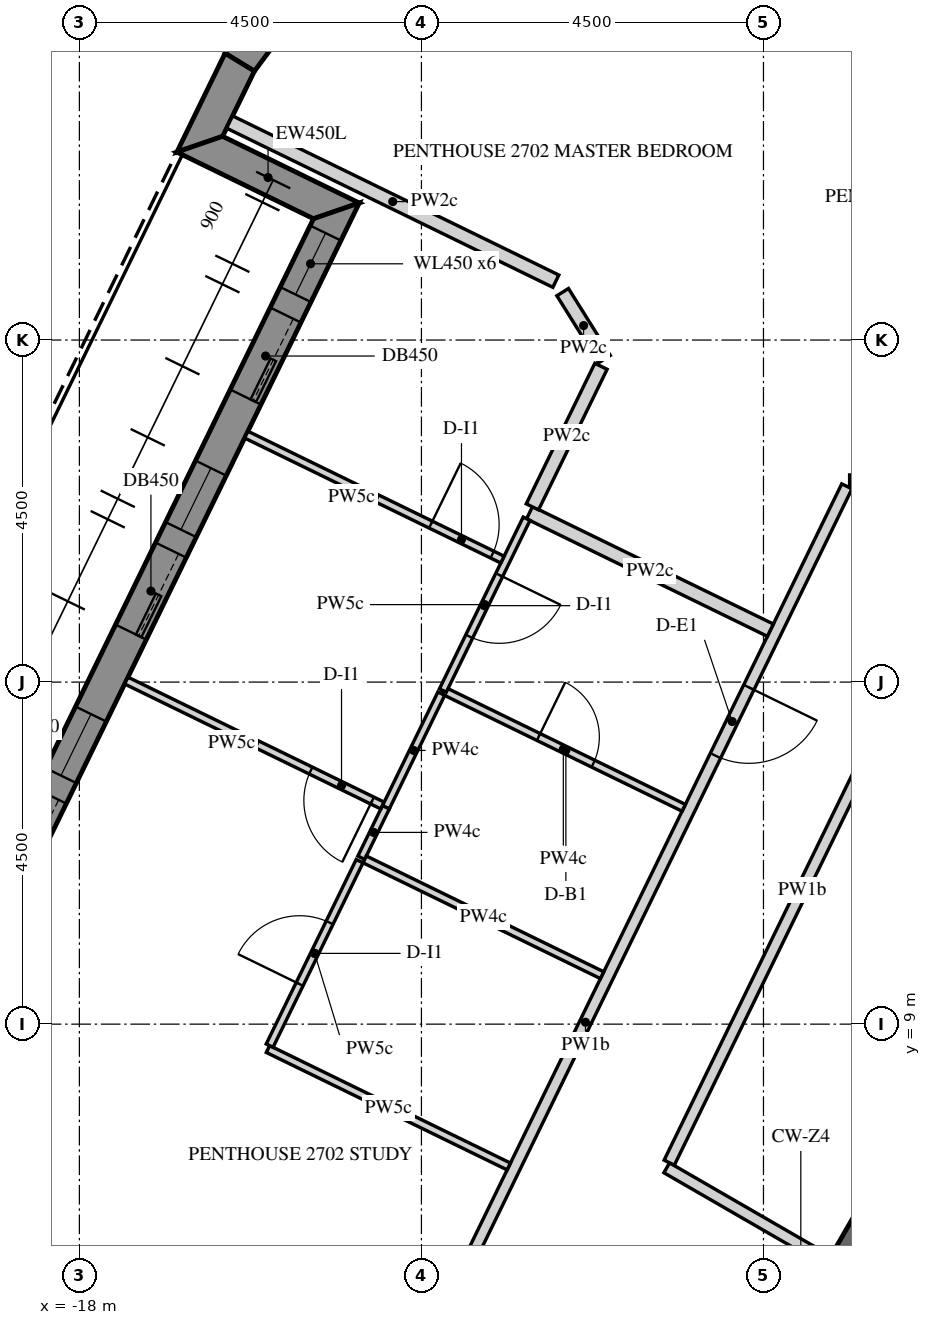
"""IFC4 building model, lengths in metres.
Left out: names, types, materials, properties, quantities, classifications, styles, units other than length and angle.
Written with IfcOpenShell. Run it as: python <this file> out.ifc"""

import sys

from ifc_helpers import new_model, si_unit, direction, frame, frame_2d, origin, place, context, subcontext, project, spatial, polyline, rectangle, outline, extrude, element, fill, save


model = new_model("IFC4")
c1 = context("Model", 3, precision=1e-05, world=origin(), true_north=direction((0.0, 1.0)))
c2 = subcontext(c1, "Body", "Model", "MODEL_VIEW")
j1 = project(units=[si_unit("LENGTHUNIT", "METRE"), si_unit("PLANEANGLEUNIT", "RADIAN")], contexts=[c1])
p1 = place(None, origin())
s1 = spatial("IfcSite", under=j1, at=p1, CompositionType="ELEMENT")
p2 = place(p1, origin())
s2 = spatial("IfcBuilding", under=s1, at=p2, CompositionType="ELEMENT")
p3 = place(p2, frame((0.0, 0.0, 353.4)))
s3 = spatial("IfcBuildingStorey", under=s2, at=p3, CompositionType="ELEMENT", Elevation=353.4)
p4 = place(p3, frame((-15.056, 22.776, -0.15), z_axis=(0.0, 0.0, 1.0), x_axis=(-0.597089203515, -0.802174845682, 0.0)))
e1 = element("IfcWall", 1, at=p4, inside=s3, PredefinedType="SOLIDWALL", context=c2, shape_type="SweptSolid", body=[
    extrude(outline(polyline([(-0.042, -0.225), (1.418, -0.225), (1.376, 0.225), (0.042, 0.225), (-0.042, -0.225)])), origin(), (0.0, 0.0, 1.0), 3.9),
])
p5 = place(p3, frame((-15.89, 21.655, -0.15), z_axis=(0.0, 0.0, 1.0), x_axis=(-0.438319390103, -0.898819287877, 0.0)))
e2 = element("IfcWall", 2, at=p5, inside=s3, PredefinedType="SOLIDWALL", context=c2, shape_type="SweptSolid", body=[
    extrude(outline(polyline([(-0.021, -0.225), (1.425, -0.225), (0.975, 0.225), (0.021, 0.225), (-0.021, -0.225)])), origin(), (0.0, 0.0, 1.0), 3.9),
])
p6 = place(p3, frame((-16.416, 20.576, -0.15), z_axis=(0.0, 0.0, 1.0), x_axis=(0.898730898244, -0.438500595829, 0.0)))
e3 = element("IfcWall", 3, at=p6, inside=s3, PredefinedType="SOLIDWALL", context=c2, shape_type="SweptSolid", body=[
    extrude(outline(polyline([(-0.225, -0.225), (1.775, -0.225), (2.225, 0.225), (0.225, 0.225), (-0.225, -0.225)])), origin(), (0.0, 0.0, 1.0), 3.9),
])
p7 = place(p3, frame((-14.619, 19.699, -0.15), z_axis=(0.0, 0.0, 1.0), x_axis=(-0.438373747484, -0.898792777851, 0.0)))
e4 = element("IfcWall", 4, at=p7, inside=s3, PredefinedType="SOLIDWALL", context=c2, shape_type="SweptSolid", body=[
    extrude(outline(polyline([(0.225, -0.225), (20.506, -0.225), (20.957, 0.225), (-0.225, 0.225), (0.225, -0.225)])), origin(), (0.0, 0.0, 1.0), 3.9),
])
p8 = place(p7, frame((0.325, 0.0, 1.05)))
e5 = element("IfcOpeningElement", 5, at=p8, cuts=e4, PredefinedType="OPENING", context=c2, shape_type="SweptSolid", body=[
    extrude(rectangle(XDim=0.9, YDim=1.5, at=frame_2d((0.45, 0.75))), frame((0.0, 0.235, 0.0), z_axis=(0.0, -1.0, 0.0), x_axis=(1.0, 0.0, 0.0)), (0.0, 0.0, 1.0), 0.47),
])
p9 = place(p7, frame((1.525, 0.0, 0.15)))
e6 = element("IfcOpeningElement", 6, at=p9, cuts=e4, PredefinedType="OPENING", context=c2, shape_type="SweptSolid", body=[
    extrude(rectangle(XDim=1.2, YDim=2.4, at=frame_2d((0.6, 1.2))), frame((0.0, 0.235, 0.0), z_axis=(0.0, -1.0, 0.0), x_axis=(1.0, 0.0, 0.0)), (0.0, 0.0, 1.0), 0.47),
])
p10 = place(p7, frame((3.766, 0.0, 1.05)))
e7 = element("IfcOpeningElement", 7, at=p10, cuts=e4, PredefinedType="OPENING", context=c2, shape_type="SweptSolid", body=[
    extrude(rectangle(XDim=0.9, YDim=1.5, at=frame_2d((0.45, 0.75))), frame((0.0, 0.235, 0.0), z_axis=(0.0, -1.0, 0.0), x_axis=(1.0, 0.0, 0.0)), (0.0, 0.0, 1.0), 0.47),
])
p11 = place(p7, frame((4.966, 0.0, 0.15)))
e8 = element("IfcOpeningElement", 8, at=p11, cuts=e4, PredefinedType="OPENING", context=c2, shape_type="SweptSolid", body=[
    extrude(rectangle(XDim=1.2, YDim=2.4, at=frame_2d((0.6, 1.2))), frame((0.0, 0.235, 0.0), z_axis=(0.0, -1.0, 0.0), x_axis=(1.0, 0.0, 0.0)), (0.0, 0.0, 1.0), 0.47),
])
p12 = place(p7, frame((7.366, 0.0, 1.05)))
e9 = element("IfcOpeningElement", 9, at=p12, cuts=e4, PredefinedType="OPENING", context=c2, shape_type="SweptSolid", body=[
    extrude(rectangle(XDim=0.9, YDim=1.5, at=frame_2d((0.45, 0.75))), frame((0.0, 0.235, 0.0), z_axis=(0.0, -1.0, 0.0), x_axis=(1.0, 0.0, 0.0)), (0.0, 0.0, 1.0), 0.47),
])
p13 = place(p7, frame((8.566, 0.0, 0.15)))
e10 = element("IfcOpeningElement", 10, at=p13, cuts=e4, PredefinedType="OPENING", context=c2, shape_type="SweptSolid", body=[
    extrude(rectangle(XDim=1.2, YDim=2.4, at=frame_2d((0.6, 1.2))), frame((0.0, 0.235, 0.0), z_axis=(0.0, -1.0, 0.0), x_axis=(1.0, 0.0, 0.0)), (0.0, 0.0, 1.0), 0.47),
])
p14 = place(p7, frame((10.966, 0.0, 1.05)))
e11 = element("IfcOpeningElement", 11, at=p14, cuts=e4, PredefinedType="OPENING", context=c2, shape_type="SweptSolid", body=[
    extrude(rectangle(XDim=0.9, YDim=1.5, at=frame_2d((0.45, 0.75))), frame((0.0, 0.235, 0.0), z_axis=(0.0, -1.0, 0.0), x_axis=(1.0, 0.0, 0.0)), (0.0, 0.0, 1.0), 0.47),
])
p15 = place(p7, frame((12.166, 0.0, 0.15)))
e12 = element("IfcOpeningElement", 12, at=p15, cuts=e4, PredefinedType="OPENING", context=c2, shape_type="SweptSolid", body=[
    extrude(rectangle(XDim=1.2, YDim=2.4, at=frame_2d((0.6, 1.2))), frame((0.0, 0.235, 0.0), z_axis=(0.0, -1.0, 0.0), x_axis=(1.0, 0.0, 0.0)), (0.0, 0.0, 1.0), 0.47),
])
p16 = place(p7, frame((14.566, 0.0, 1.05)))
e13 = element("IfcOpeningElement", 13, at=p16, cuts=e4, PredefinedType="OPENING", context=c2, shape_type="SweptSolid", body=[
    extrude(rectangle(XDim=0.9, YDim=1.5, at=frame_2d((0.45, 0.75))), frame((0.0, 0.235, 0.0), z_axis=(0.0, -1.0, 0.0), x_axis=(1.0, 0.0, 0.0)), (0.0, 0.0, 1.0), 0.47),
])
p17 = place(p7, frame((15.766, 0.0, 0.15)))
e14 = element("IfcOpeningElement", 14, at=p17, cuts=e4, PredefinedType="OPENING", context=c2, shape_type="SweptSolid", body=[
    extrude(rectangle(XDim=1.2, YDim=2.4, at=frame_2d((0.6, 1.2))), frame((0.0, 0.235, 0.0), z_axis=(0.0, -1.0, 0.0), x_axis=(1.0, 0.0, 0.0)), (0.0, 0.0, 1.0), 0.47),
])
p18 = place(p7, frame((18.007, 0.0, 1.05)))
e15 = element("IfcOpeningElement", 15, at=p18, cuts=e4, PredefinedType="OPENING", context=c2, shape_type="SweptSolid", body=[
    extrude(rectangle(XDim=0.9, YDim=1.5, at=frame_2d((0.45, 0.75))), frame((0.0, 0.235, 0.0), z_axis=(0.0, -1.0, 0.0), x_axis=(1.0, 0.0, 0.0)), (0.0, 0.0, 1.0), 0.47),
])
p19 = place(p7, frame((19.207, 0.0, 0.15)))
e16 = element("IfcOpeningElement", 16, at=p19, cuts=e4, PredefinedType="OPENING", context=c2, shape_type="SweptSolid", body=[
    extrude(rectangle(XDim=1.2, YDim=2.4, at=frame_2d((0.6, 1.2))), frame((0.0, 0.235, 0.0), z_axis=(0.0, -1.0, 0.0), x_axis=(1.0, 0.0, 0.0)), (0.0, 0.0, 1.0), 0.47),
])
p20 = place(p3, frame((-5.673, 9.825, -0.15), z_axis=(0.0, 0.0, 1.0), x_axis=(-0.499995046907, -0.866028263435, 0.0)))
e17 = element("IfcWall", 17, at=p20, inside=s3, PredefinedType="SHEAR", context=c2, shape_type="SweptSolid", body=[
    extrude(outline(polyline([(-0.101, -0.175), (11.446, -0.175), (11.244, 0.175), (0.101, 0.175), (-0.101, -0.175)])), origin(), (0.0, 0.0, 1.0), 3.9),
])
p21 = place(p20, frame((4.801, 0.0, 0.15)))
e18 = element("IfcOpeningElement", 18, at=p21, cuts=e17, PredefinedType="OPENING", context=c2, shape_type="SweptSolid", body=[
    extrude(rectangle(XDim=1.8, YDim=2.4, at=frame_2d((0.9, 1.2))), frame((0.0, 0.185, 0.0), z_axis=(0.0, -1.0, 0.0), x_axis=(1.0, 0.0, 0.0)), (0.0, 0.0, 1.0), 0.37),
])
p22 = place(p3, frame((6.1, 16.15, 0.0), z_axis=(0.0, 0.0, 1.0), x_axis=(-1.0, 0.0, 0.0)))
e19 = element("IfcWall", 19, at=p22, inside=s3, PredefinedType="PARTITIONING", context=c2, shape_type="SweptSolid", body=[
    extrude(rectangle(XDim=13.966, YDim=0.15, at=frame_2d((6.983, 0.0))), origin(), (0.0, 0.0, 1.0), 2.82),
])
p23 = place(p22, frame((0.925, 0.0, 0.0)))
e20 = element("IfcOpeningElement", 20, at=p23, cuts=e19, PredefinedType="OPENING", context=c2, shape_type="SweptSolid", body=[
    extrude(rectangle(XDim=1.0, YDim=2.1, at=frame_2d((0.5, 1.05))), frame((0.0, 0.085, 0.0), z_axis=(0.0, -1.0, 0.0), x_axis=(1.0, 0.0, 0.0)), (0.0, 0.0, 1.0), 0.17),
])
p24 = place(p3, frame((-7.903, 16.075, 0.0), z_axis=(0.0, 0.0, 1.0), x_axis=(-0.438364761272, -0.898797160696, 0.0)))
e21 = element("IfcWall", 21, at=p24, inside=s3, PredefinedType="PARTITIONING", context=c2, shape_type="SweptSolid", body=[
    extrude(rectangle(XDim=15.688, YDim=0.15, at=frame_2d((7.844, 0.0))), origin(), (0.0, 0.0, 1.0), 2.82),
])
p25 = place(p24, frame((2.942, 0.0, 0.0)))
e22 = element("IfcOpeningElement", 22, at=p25, cuts=e21, PredefinedType="OPENING", context=c2, shape_type="SweptSolid", body=[
    extrude(rectangle(XDim=1.0, YDim=2.1, at=frame_2d((0.5, 1.05))), frame((0.0, 0.085, 0.0), z_axis=(0.0, -1.0, 0.0), x_axis=(1.0, 0.0, 0.0)), (0.0, 0.0, 1.0), 0.17),
])
p26 = place(p3, frame((-8.15, 5.884, 0.0), z_axis=(0.0, 0.0, 1.0), x_axis=(-0.866009790468, 0.500027042082, 0.0)))
e23 = element("IfcWall", 23, at=p26, inside=s3, PredefinedType="PARTITIONING", context=c2, shape_type="SweptSolid", body=[
    extrude(rectangle(XDim=2.451, YDim=0.15, at=frame_2d((1.226, 0.0))), origin(), (0.0, 0.0, 1.0), 2.82),
])
p27 = place(p3, frame((-10.24, 7.178, 0.0), z_axis=(0.0, 0.0, 1.0), x_axis=(0.438356120288, 0.898801375058, 0.0)))
e24 = element("IfcWall", 24, at=p27, inside=s3, PredefinedType="PARTITIONING", context=c2, shape_type="SweptSolid", body=[
    extrude(rectangle(XDim=7.98, YDim=0.15, at=frame_2d((3.99, 0.0))), origin(), (0.0, 0.0, 1.0), 2.82),
])
p28 = place(p3, frame((-12.078, 15.728, 0.0), z_axis=(0.0, 0.0, 1.0), x_axis=(0.898802391248, -0.438354036696, 0.0)))
e25 = element("IfcWall", 25, at=p28, inside=s3, PredefinedType="PARTITIONING", context=c2, shape_type="SweptSolid", body=[
    extrude(rectangle(XDim=3.525, YDim=0.18, at=frame_2d((1.762, 0.0))), origin(), (0.0, 0.0, 1.0), 2.82),
])
p29 = place(p3, frame((-16.024, 20.868, 0.0), z_axis=(0.0, 0.0, 1.0), x_axis=(0.898790554329, -0.438378306317, 0.0)))
e26 = element("IfcWall", 26, at=p29, inside=s3, PredefinedType="PARTITIONING", context=c2, shape_type="SweptSolid", body=[
    extrude(rectangle(XDim=4.776, YDim=0.18, at=frame_2d((2.388, 0.0))), origin(), (0.0, 0.0, 1.0), 2.82),
])
p30 = place(p3, frame((-11.642, 18.63, 0.0), z_axis=(0.0, 0.0, 1.0), x_axis=(0.530041214548, -0.847971880949, 0.0)))
e27 = element("IfcWall", 27, at=p30, inside=s3, PredefinedType="PARTITIONING", context=c2, shape_type="SweptSolid", body=[
    extrude(rectangle(XDim=1.038, YDim=0.18, at=frame_2d((0.519, 0.0))), origin(), (0.0, 0.0, 1.0), 2.82),
])
p31 = place(p3, frame((-11.138, 17.655, 0.0), z_axis=(0.0, 0.0, 1.0), x_axis=(-0.438409602339, -0.898775289256, 0.0)))
e28 = element("IfcWall", 28, at=p31, inside=s3, PredefinedType="PARTITIONING", context=c2, shape_type="SweptSolid", body=[
    extrude(rectangle(XDim=2.057, YDim=0.18, at=frame_2d((1.029, 0.0))), origin(), (0.0, 0.0, 1.0), 2.82),
])
p32 = place(p3, frame((-14.291, 11.189, 0.0), z_axis=(0.0, 0.0, 1.0), x_axis=(0.438105837585, 0.898923397779, 0.0)))
e29 = element("IfcWall", 29, at=p32, inside=s3, PredefinedType="PARTITIONING", context=c2, shape_type="SweptSolid", body=[
    extrude(rectangle(XDim=0.742, YDim=0.1, at=frame_2d((0.371, 0.0))), origin(), (0.0, 0.0, 1.0), 2.82),
])
p33 = place(p3, frame((-14.012, 11.876, 0.0), z_axis=(0.0, 0.0, 1.0), x_axis=(-0.898810362659, 0.438337691713, 0.0)))
e30 = element("IfcWall", 30, at=p33, inside=s3, PredefinedType="PARTITIONING", context=c2, shape_type="SweptSolid", body=[
    extrude(rectangle(XDim=3.75, YDim=0.1, at=frame_2d((1.875, 0.0))), origin(), (0.0, 0.0, 1.0), 2.82),
])
p34 = place(p33, frame((0.15, 0.0, 0.0)))
e31 = element("IfcOpeningElement", 31, at=p34, cuts=e30, PredefinedType="OPENING", context=c2, shape_type="SweptSolid", body=[
    extrude(rectangle(XDim=0.9, YDim=2.1, at=frame_2d((0.45, 1.05))), frame((0.0, 0.06, 0.0), z_axis=(0.0, -1.0, 0.0), x_axis=(1.0, 0.0, 0.0)), (0.0, 0.0, 1.0), 0.12),
])
p35 = place(p3, frame((-12.351, 7.127, 0.0), z_axis=(0.0, 0.0, 1.0), x_axis=(-0.898802391248, 0.438354036696, 0.0)))
e32 = element("IfcWall", 32, at=p35, inside=s3, PredefinedType="PARTITIONING", context=c2, shape_type="SweptSolid", body=[
    extrude(rectangle(XDim=3.525, YDim=0.1, at=frame_2d((1.762, 0.0))), origin(), (0.0, 0.0, 1.0), 2.82),
])
p36 = place(p3, frame((-15.497, 8.718, 0.0), z_axis=(0.0, 0.0, 1.0), x_axis=(0.438366623032, 0.898796252669, 0.0)))
e33 = element("IfcWall", 33, at=p36, inside=s3, PredefinedType="PARTITIONING", context=c2, shape_type="SweptSolid", body=[
    extrude(rectangle(XDim=2.7, YDim=0.1, at=frame_2d((1.35, 0.0))), origin(), (0.0, 0.0, 1.0), 2.82),
])
p37 = place(p36, frame((0.9, 0.0, 0.0)))
e34 = element("IfcOpeningElement", 34, at=p37, cuts=e33, PredefinedType="OPENING", context=c2, shape_type="SweptSolid", body=[
    extrude(rectangle(XDim=0.9, YDim=2.1, at=frame_2d((0.45, 1.05))), frame((0.0, 0.06, 0.0), z_axis=(0.0, -1.0, 0.0), x_axis=(1.0, 0.0, 0.0)), (0.0, 0.0, 1.0), 0.12),
])
p38 = place(p3, frame((-13.217, 13.391, 0.0), z_axis=(0.0, 0.0, 1.0), x_axis=(0.898775101867, -0.438409986501, 0.0)))
e35 = element("IfcWall", 35, at=p38, inside=s3, PredefinedType="PARTITIONING", context=c2, shape_type="SweptSolid", body=[
    extrude(rectangle(XDim=3.525, YDim=0.1, at=frame_2d((1.763, 0.0))), origin(), (0.0, 0.0, 1.0), 2.82),
])
p39 = place(p38, frame((1.4, 0.0, 0.0)))
e36 = element("IfcOpeningElement", 36, at=p39, cuts=e35, PredefinedType="OPENING", context=c2, shape_type="SweptSolid", body=[
    extrude(rectangle(XDim=0.8, YDim=2.1, at=frame_2d((0.4, 1.05))), frame((0.0, 0.06, 0.0), z_axis=(0.0, -1.0, 0.0), x_axis=(1.0, 0.0, 0.0)), (0.0, 0.0, 1.0), 0.12),
])
p40 = place(p3, frame((-12.116, 15.649, 0.0), z_axis=(0.0, 0.0, 1.0), x_axis=(-0.438335623405, -0.898811371342, 0.0)))
e37 = element("IfcWall", 37, at=p40, inside=s3, PredefinedType="PARTITIONING", context=c2, shape_type="SweptSolid", body=[
    extrude(rectangle(XDim=2.514, YDim=0.1, at=frame_2d((1.257, 0.0))), origin(), (0.0, 0.0, 1.0), 2.82),
])
p41 = place(p40, frame((0.822, 0.0, 0.0)))
e38 = element("IfcOpeningElement", 38, at=p41, cuts=e37, PredefinedType="OPENING", context=c2, shape_type="SweptSolid", body=[
    extrude(rectangle(XDim=0.9, YDim=2.1, at=frame_2d((0.45, 1.05))), frame((0.0, 0.06, 0.0), z_axis=(0.0, -1.0, 0.0), x_axis=(1.0, 0.0, 0.0)), (0.0, 0.0, 1.0), 0.12),
])
p42 = place(p3, frame((-13.238, 13.348, 0.0), z_axis=(0.0, 0.0, 1.0), x_axis=(-0.438380229518, -0.898789616299, 0.0)))
e39 = element("IfcWall", 39, at=p42, inside=s3, PredefinedType="PARTITIONING", context=c2, shape_type="SweptSolid", body=[
    extrude(rectangle(XDim=1.662, YDim=0.1, at=frame_2d((0.831, 0.0))), origin(), (0.0, 0.0, 1.0), 2.82),
])
p43 = place(p3, frame((-14.246, 11.167, 0.0), z_axis=(0.0, 0.0, 1.0), x_axis=(0.89880963085, -0.438339192283, 0.0)))
e40 = element("IfcWall", 40, at=p43, inside=s3, PredefinedType="PARTITIONING", context=c2, shape_type="SweptSolid", body=[
    extrude(rectangle(XDim=3.475, YDim=0.1, at=frame_2d((1.737, 0.0))), origin(), (0.0, 0.0, 1.0), 2.82),
])
p44 = place(p3, frame((-15.804, 16.756, 0.0), z_axis=(0.0, 0.0, 1.0), x_axis=(0.89878471246, -0.438390283479, 0.0)))
e41 = element("IfcWall", 41, at=p44, inside=s3, PredefinedType="PARTITIONING", context=c2, shape_type="SweptSolid", body=[
    extrude(rectangle(XDim=3.75, YDim=0.1, at=frame_2d((1.875, 0.0))), origin(), (0.0, 0.0, 1.0), 2.82),
])
p45 = place(p44, frame((2.7, 0.0, 0.0)))
e42 = element("IfcOpeningElement", 42, at=p45, cuts=e41, PredefinedType="OPENING", context=c2, shape_type="SweptSolid", body=[
    extrude(rectangle(XDim=0.9, YDim=2.1, at=frame_2d((0.45, 1.05))), frame((0.0, 0.06, 0.0), z_axis=(0.0, -1.0, 0.0), x_axis=(1.0, 0.0, 0.0)), (0.0, 0.0, 1.0), 0.12),
])
p46 = place(p8, frame((0.0, 0.155, 0.0)))
e43 = element("IfcWindow", 43, at=p46, inside=s3, PartitioningType="SINGLE_PANEL", PredefinedType="WINDOW", context=c2, shape_type="SweptSolid", body=[
    extrude(rectangle(XDim=0.9, YDim=1.5, at=frame_2d((0.45, 0.75))), frame((0.0, 0.03, 0.0), z_axis=(0.0, -1.0, 0.0), x_axis=(1.0, 0.0, 0.0)), (0.0, 0.0, 1.0), 0.06),
])
fill(e5, e43)
p47 = place(p9, frame((0.0, 0.15, 0.0)))
e44 = element("IfcDoor", 44, at=p47, inside=s3, OperationType="SLIDING_TO_LEFT", PredefinedType="DOOR", context=c2, shape_type="SweptSolid", body=[
    extrude(rectangle(XDim=1.2, YDim=2.4, at=frame_2d((0.6, 1.2))), frame((0.0, 0.025, 0.0), z_axis=(0.0, -1.0, 0.0), x_axis=(1.0, 0.0, 0.0)), (0.0, 0.0, 1.0), 0.05),
])
fill(e6, e44)
p48 = place(p10, frame((0.0, 0.155, 0.0)))
e45 = element("IfcWindow", 45, at=p48, inside=s3, PartitioningType="SINGLE_PANEL", PredefinedType="WINDOW", context=c2, shape_type="SweptSolid", body=[
    extrude(rectangle(XDim=0.9, YDim=1.5, at=frame_2d((0.45, 0.75))), frame((0.0, 0.03, 0.0), z_axis=(0.0, -1.0, 0.0), x_axis=(1.0, 0.0, 0.0)), (0.0, 0.0, 1.0), 0.06),
])
fill(e7, e45)
p49 = place(p11, frame((0.0, 0.15, 0.0)))
e46 = element("IfcDoor", 46, at=p49, inside=s3, OperationType="SLIDING_TO_LEFT", PredefinedType="DOOR", context=c2, shape_type="SweptSolid", body=[
    extrude(rectangle(XDim=1.2, YDim=2.4, at=frame_2d((0.6, 1.2))), frame((0.0, 0.025, 0.0), z_axis=(0.0, -1.0, 0.0), x_axis=(1.0, 0.0, 0.0)), (0.0, 0.0, 1.0), 0.05),
])
fill(e8, e46)
p50 = place(p12, frame((0.0, 0.155, 0.0)))
e47 = element("IfcWindow", 47, at=p50, inside=s3, PartitioningType="SINGLE_PANEL", PredefinedType="WINDOW", context=c2, shape_type="SweptSolid", body=[
    extrude(rectangle(XDim=0.9, YDim=1.5, at=frame_2d((0.45, 0.75))), frame((0.0, 0.03, 0.0), z_axis=(0.0, -1.0, 0.0), x_axis=(1.0, 0.0, 0.0)), (0.0, 0.0, 1.0), 0.06),
])
fill(e9, e47)
p51 = place(p13, frame((0.0, 0.15, 0.0)))
e48 = element("IfcDoor", 48, at=p51, inside=s3, OperationType="SLIDING_TO_LEFT", PredefinedType="DOOR", context=c2, shape_type="SweptSolid", body=[
    extrude(rectangle(XDim=1.2, YDim=2.4, at=frame_2d((0.6, 1.2))), frame((0.0, 0.025, 0.0), z_axis=(0.0, -1.0, 0.0), x_axis=(1.0, 0.0, 0.0)), (0.0, 0.0, 1.0), 0.05),
])
fill(e10, e48)
p52 = place(p25, origin())
e49 = element("IfcDoor", 49, at=p52, inside=s3, OperationType="SINGLE_SWING_LEFT", PredefinedType="DOOR", context=c2, shape_type="SweptSolid", body=[
    extrude(rectangle(XDim=1.0, YDim=2.1, at=frame_2d((0.5, 1.05))), frame((0.0, 0.025, 0.0), z_axis=(0.0, -1.0, 0.0), x_axis=(1.0, 0.0, 0.0)), (0.0, 0.0, 1.0), 0.05),
])
fill(e22, e49)
p53 = place(p39, origin())
e50 = element("IfcDoor", 50, at=p53, inside=s3, OperationType="SINGLE_SWING_LEFT", PredefinedType="DOOR", context=c2, shape_type="SweptSolid", body=[
    extrude(rectangle(XDim=0.8, YDim=2.1, at=frame_2d((0.4, 1.05))), frame((0.0, 0.025, 0.0), z_axis=(0.0, -1.0, 0.0), x_axis=(1.0, 0.0, 0.0)), (0.0, 0.0, 1.0), 0.05),
])
fill(e36, e50)
p54 = place(p41, origin())
e51 = element("IfcDoor", 51, at=p54, inside=s3, OperationType="SINGLE_SWING_LEFT", PredefinedType="DOOR", context=c2, shape_type="SweptSolid", body=[
    extrude(rectangle(XDim=0.9, YDim=2.1, at=frame_2d((0.45, 1.05))), frame((0.0, 0.025, 0.0), z_axis=(0.0, -1.0, 0.0), x_axis=(1.0, 0.0, 0.0)), (0.0, 0.0, 1.0), 0.05),
])
fill(e38, e51)
p55 = place(p45, origin())
e52 = element("IfcDoor", 52, at=p55, inside=s3, OperationType="SINGLE_SWING_RIGHT", PredefinedType="DOOR", context=c2, shape_type="SweptSolid", body=[
    extrude(rectangle(XDim=0.9, YDim=2.1, at=frame_2d((0.45, 1.05))), frame((0.0, 0.025, 0.0), z_axis=(0.0, -1.0, 0.0), x_axis=(1.0, 0.0, 0.0)), (0.0, 0.0, 1.0), 0.05),
])
fill(e42, e52)
p56 = place(p34, origin())
e53 = element("IfcDoor", 53, at=p56, inside=s3, OperationType="SINGLE_SWING_RIGHT", PredefinedType="DOOR", context=c2, shape_type="SweptSolid", body=[
    extrude(rectangle(XDim=0.9, YDim=2.1, at=frame_2d((0.45, 1.05))), frame((0.0, 0.025, 0.0), z_axis=(0.0, -1.0, 0.0), x_axis=(1.0, 0.0, 0.0)), (0.0, 0.0, 1.0), 0.05),
])
fill(e31, e53)
p57 = place(p37, origin())
e54 = element("IfcDoor", 54, at=p57, inside=s3, OperationType="SINGLE_SWING_RIGHT", PredefinedType="DOOR", context=c2, shape_type="SweptSolid", body=[
    extrude(rectangle(XDim=0.9, YDim=2.1, at=frame_2d((0.45, 1.05))), frame((0.0, 0.025, 0.0), z_axis=(0.0, -1.0, 0.0), x_axis=(1.0, 0.0, 0.0)), (0.0, 0.0, 1.0), 0.05),
])
fill(e34, e54)
save(model, sys.argv[1])
